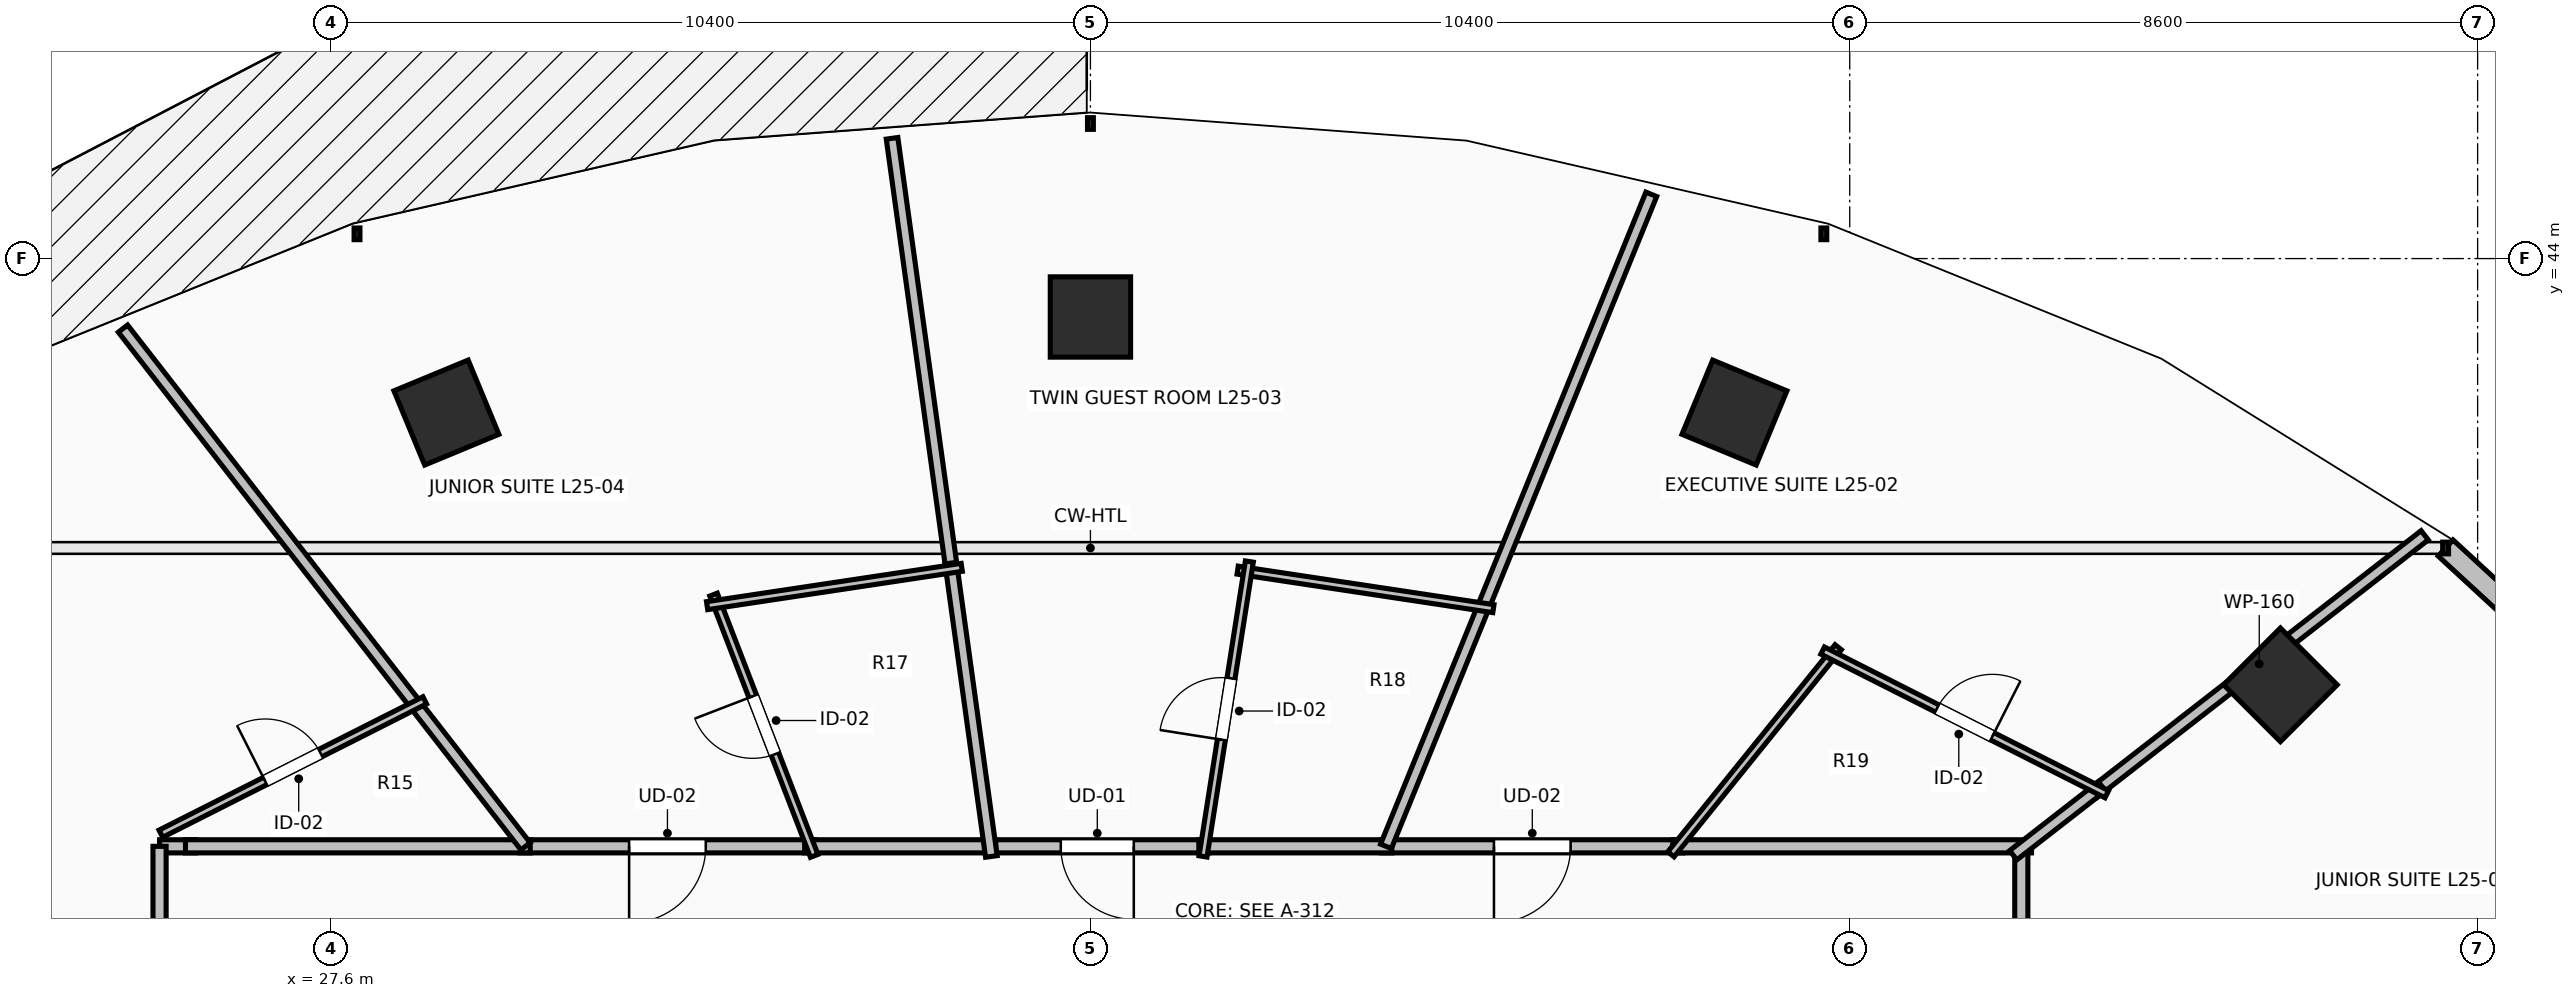
"""IFC4 building model, lengths in metres.
Left out: names, types, materials, properties, quantities, classifications, styles, units other than length and angle.
Written with IfcOpenShell. Run it as: python <this file> out.ifc"""

import sys

from ifc_helpers import new_model, si_unit, direction, frame, frame_2d, origin, origin_2d, place, context, subcontext, project, spatial, rectangle, extrude, element, fill, save


model = new_model("IFC4")
c1 = context("Model", 3, precision=1e-05, world=origin(), true_north=direction((0.0, 1.0)))
c2 = subcontext(c1, "Body", "Model", "MODEL_VIEW")
j1 = project(units=[si_unit("LENGTHUNIT", "METRE"), si_unit("PLANEANGLEUNIT", "RADIAN")], contexts=[c1])
p1 = place(None, origin())
s1 = spatial("IfcSite", under=j1, at=p1, CompositionType="ELEMENT")
p2 = place(p1, origin())
s2 = spatial("IfcBuilding", under=s1, at=p2, CompositionType="ELEMENT")
p3 = place(p2, frame((0.0, 0.0, 96.3)))
s3 = spatial("IfcBuildingStorey", under=s2, at=p3, CompositionType="ELEMENT", Elevation=96.3)
for number, where, z_axis, x_axis in (
    (1, (54.299, 38.162, 0.0), (0.0, 0.0, 1.0), (0.707, 0.707, 0.0)),
    (2, (46.821, 41.891, 0.0), (0.0, 0.0, 1.0), (0.383, 0.924, 0.0)),
    (3, (38.0, 43.2, 0.0), (0.0, 0.0, 1.0), (0.0, 1.0, 0.0)),
    (4, (29.179, 41.891, 0.0), (0.0, 0.0, 1.0), (-0.383, 0.924, 0.0)),
):
    element("IfcColumn", number, at=place(p3, frame(where, z_axis=z_axis, x_axis=x_axis)), inside=s3, PredefinedType="COLUMN", context=c2, shape_type="SweptSolid", body=[
        extrude(rectangle(XDim=1.1, YDim=1.1, at=origin_2d()), origin(), (0.0, 0.0, 1.0), 3.5),
    ])
p4 = place(p3, frame((59.826, 37.028, 0.0), z_axis=(0.0, 0.0, 1.0), x_axis=(-0.735416718093, 0.677615119924, 0.0)))
e5 = element("IfcWall", 5, at=p4, inside=s3, PredefinedType="STANDARD", context=c2, shape_type="SweptSolid", body=[
    extrude(rectangle(XDim=4.439, YDim=0.3, at=frame_2d((2.22, 0.0))), origin(), (0.0, 0.0, 1.0), 3.24),
])
p5 = place(p4, frame((1.32, 0.0, 0.85)))
e6 = element("IfcOpeningElement", 6, at=p5, cuts=e5, PredefinedType="OPENING", context=c2, shape_type="SweptSolid", body=[
    extrude(rectangle(XDim=1.8, YDim=2.19, at=frame_2d((0.9, 1.095))), frame((0.0, 0.165, 0.0), z_axis=(0.0, -1.0, 0.0), x_axis=(1.0, 0.0, 0.0)), (0.0, 0.0, 1.0), 0.33),
])
p6 = place(p3, frame((50.75, 30.853, 0.0), z_axis=(0.0, 0.0, 1.0), x_axis=(0.0, 1.0, 0.0)))
e7 = element("IfcWall", 7, at=p6, inside=s3, PredefinedType="PARTITIONING", context=c2, shape_type="SweptSolid", body=[
    extrude(rectangle(XDim=5.097, YDim=0.18, at=frame_2d((2.548, 0.0))), origin(), (0.0, 0.0, 1.0), 2.432),
])
p7 = place(p6, frame((2.023, 0.0, 0.0)))
e8 = element("IfcOpeningElement", 8, at=p7, cuts=e7, PredefinedType="OPENING", context=c2, shape_type="SweptSolid", body=[
    extrude(rectangle(XDim=1.05, YDim=2.2, at=frame_2d((0.525, 1.1))), frame((0.0, 0.105, 0.0), z_axis=(0.0, -1.0, 0.0), x_axis=(1.0, 0.0, 0.0)), (0.0, 0.0, 1.0), 0.21),
])
p8 = place(p3, frame((46.116, 35.95, 0.0), z_axis=(0.0, 0.0, 1.0), x_axis=(-1.0, 0.0, 0.0)))
e9 = element("IfcWall", 9, at=p8, inside=s3, PredefinedType="PARTITIONING", context=c2, shape_type="SweptSolid", body=[
    extrude(rectangle(XDim=4.128, YDim=0.18, at=frame_2d((2.064, 0.0))), origin(), (0.0, 0.0, 1.0), 2.972),
])
p9 = place(p8, frame((1.539, 0.0, 0.0)))
e10 = element("IfcOpeningElement", 10, at=p9, cuts=e9, PredefinedType="OPENING", context=c2, shape_type="SweptSolid", body=[
    extrude(rectangle(XDim=1.05, YDim=2.2, at=frame_2d((0.525, 1.1))), frame((0.0, 0.105, 0.0), z_axis=(0.0, -1.0, 0.0), x_axis=(1.0, 0.0, 0.0)), (0.0, 0.0, 1.0), 0.21),
])
p10 = place(p3, frame((50.89, 35.95, 0.0), z_axis=(0.0, 0.0, 1.0), x_axis=(-1.0, 0.0, 0.0)))
e11 = element("IfcWall", 11, at=p10, inside=s3, PredefinedType="PARTITIONING", context=c2, shape_type="SweptSolid", body=[
    extrude(rectangle(XDim=4.914, YDim=0.18, at=frame_2d((2.457, 0.0))), origin(), (0.0, 0.0, 1.0), 2.432),
])
p11 = place(p3, frame((39.625, 35.95, 0.0), z_axis=(0.0, 0.0, 1.0), x_axis=(-1.0, 0.0, 0.0)))
e12 = element("IfcWall", 12, at=p11, inside=s3, PredefinedType="PARTITIONING", context=c2, shape_type="SweptSolid", body=[
    extrude(rectangle(XDim=3.062, YDim=0.18, at=frame_2d((1.531, 0.0))), origin(), (0.0, 0.0, 1.0), 2.972),
])
p12 = place(p11, frame((1.031, 0.0, 0.0)))
e13 = element("IfcOpeningElement", 13, at=p12, cuts=e12, PredefinedType="OPENING", context=c2, shape_type="SweptSolid", body=[
    extrude(rectangle(XDim=1.0, YDim=2.15, at=frame_2d((0.5, 1.075))), frame((0.0, 0.105, 0.0), z_axis=(0.0, -1.0, 0.0), x_axis=(1.0, 0.0, 0.0)), (0.0, 0.0, 1.0), 0.21),
])
p13 = place(p3, frame((42.128, 35.95, 0.0), z_axis=(0.0, 0.0, 1.0), x_axis=(-1.0, 0.0, 0.0)))
e14 = element("IfcWall", 14, at=p13, inside=s3, PredefinedType="PARTITIONING", context=c2, shape_type="SweptSolid", body=[
    extrude(rectangle(XDim=2.643, YDim=0.18, at=frame_2d((1.321, 0.0))), origin(), (0.0, 0.0, 1.0), 2.972),
])
p14 = place(p3, frame((34.226, 35.95, 0.0), z_axis=(0.0, 0.0, 1.0), x_axis=(-1.0, 0.0, 0.0)))
e15 = element("IfcWall", 15, at=p14, inside=s3, PredefinedType="PARTITIONING", context=c2, shape_type="SweptSolid", body=[
    extrude(rectangle(XDim=4.039, YDim=0.18, at=frame_2d((2.02, 0.0))), origin(), (0.0, 0.0, 1.0), 2.432),
])
p15 = place(p14, frame((1.494, 0.0, 0.0)))
e16 = element("IfcOpeningElement", 16, at=p15, cuts=e15, PredefinedType="OPENING", context=c2, shape_type="SweptSolid", body=[
    extrude(rectangle(XDim=1.05, YDim=2.2, at=frame_2d((0.525, 1.1))), frame((0.0, 0.105, 0.0), z_axis=(0.0, -1.0, 0.0), x_axis=(1.0, 0.0, 0.0)), (0.0, 0.0, 1.0), 0.21),
])
p16 = place(p3, frame((36.703, 35.95, 0.0), z_axis=(0.0, 0.0, 1.0), x_axis=(-1.0, 0.0, 0.0)))
e17 = element("IfcWall", 17, at=p16, inside=s3, PredefinedType="PARTITIONING", context=c2, shape_type="SweptSolid", body=[
    extrude(rectangle(XDim=2.617, YDim=0.18, at=frame_2d((1.309, 0.0))), origin(), (0.0, 0.0, 1.0), 2.972),
])
p17 = place(p3, frame((25.745, 35.95, 0.0), z_axis=(0.0, 0.0, 1.0), x_axis=(-1.0, 0.0, 0.0)))
e18 = element("IfcWall", 18, at=p17, inside=s3, PredefinedType="PARTITIONING", context=c2, shape_type="SweptSolid", body=[
    extrude(rectangle(XDim=0.495, YDim=0.18, at=frame_2d((0.248, 0.0))), origin(), (0.0, 0.0, 1.0), 3.24),
])
p18 = place(p3, frame((25.25, 35.95, 0.0), z_axis=(0.0, 0.0, 1.0), x_axis=(0.0, -1.0, 0.0)))
e19 = element("IfcWall", 19, at=p18, inside=s3, PredefinedType="PARTITIONING", context=c2, shape_type="SweptSolid", body=[
    extrude(rectangle(XDim=4.822, YDim=0.18, at=frame_2d((2.411, 0.0))), origin(), (0.0, 0.0, 1.0), 2.432),
])
p19 = place(p18, frame((1.886, 0.0, 0.0)))
e20 = element("IfcOpeningElement", 20, at=p19, cuts=e19, PredefinedType="OPENING", context=c2, shape_type="SweptSolid", body=[
    extrude(rectangle(XDim=1.05, YDim=2.2, at=frame_2d((0.525, 1.1))), frame((0.0, 0.105, 0.0), z_axis=(0.0, -1.0, 0.0), x_axis=(1.0, 0.0, 0.0)), (0.0, 0.0, 1.0), 0.21),
])
p20 = place(p3, frame((30.327, 35.95, 0.0), z_axis=(0.0, 0.0, 1.0), x_axis=(-1.0, 0.0, 0.0)))
e21 = element("IfcWall", 21, at=p20, inside=s3, PredefinedType="PARTITIONING", context=c2, shape_type="SweptSolid", body=[
    extrude(rectangle(XDim=4.722, YDim=0.18, at=frame_2d((2.361, 0.0))), origin(), (0.0, 0.0, 1.0), 2.432),
])
p21 = place(p3, frame((56.275, 40.21, 0.0), z_axis=(0.0, 0.0, 1.0), x_axis=(-0.78943235806, -0.613837561614, 0.0)))
e22 = element("IfcWall", 22, at=p21, inside=s3, PredefinedType="PARTITIONING", context=c2, shape_type="SweptSolid", body=[
    extrude(rectangle(XDim=5.741, YDim=0.16, at=frame_2d((2.87, 0.0))), origin(), (0.0, 0.0, 1.0), 2.677),
])
p22 = place(p3, frame((51.854, 36.772, 0.0), z_axis=(0.0, 0.0, 1.0), x_axis=(-0.789420593357, -0.613852691436, 0.0)))
e23 = element("IfcWall", 23, at=p22, inside=s3, PredefinedType="PARTITIONING", context=c2, shape_type="SweptSolid", body=[
    extrude(rectangle(XDim=1.538, YDim=0.16, at=frame_2d((0.769, 0.0))), origin(), (0.0, 0.0, 1.0), 2.922),
])
p23 = place(p3, frame((45.951, 35.841, 0.0), z_axis=(0.0, 0.0, 1.0), x_axis=(0.628411924203, 0.77788074505, 0.0)))
e24 = element("IfcWall", 24, at=p23, inside=s3, PredefinedType="PARTITIONING", context=c2, shape_type="SweptSolid", body=[
    extrude(rectangle(XDim=3.646, YDim=0.11, at=frame_2d((1.823, 0.0))), origin(), (0.0, 0.0, 1.0), 2.432),
])
p24 = place(p3, frame((48.029, 38.631, 0.0), z_axis=(0.0, 0.0, 1.0), x_axis=(0.892459125519, -0.451128262558, 0.0)))
e25 = element("IfcWall", 25, at=p24, inside=s3, PredefinedType="PARTITIONING", context=c2, shape_type="SweptSolid", body=[
    extrude(rectangle(XDim=4.361, YDim=0.11, at=frame_2d((2.18, 0.0))), origin(), (0.0, 0.0, 1.0), 3.24),
])
p25 = place(p24, frame((1.755, 0.0, 0.0)))
e26 = element("IfcOpeningElement", 26, at=p25, cuts=e25, PredefinedType="OPENING", context=c2, shape_type="SweptSolid", body=[
    extrude(rectangle(XDim=0.85, YDim=2.1, at=frame_2d((0.425, 1.05))), frame((0.0, 0.07, 0.0), z_axis=(0.0, -1.0, 0.0), x_axis=(1.0, 0.0, 0.0)), (0.0, 0.0, 1.0), 0.14),
])
p26 = place(p3, frame((45.682, 44.88, 0.0), z_axis=(0.0, 0.0, 1.0), x_axis=(-0.376911553655, -0.9262492541, 0.0)))
e27 = element("IfcWall", 27, at=p26, inside=s3, PredefinedType="PARTITIONING", context=c2, shape_type="SweptSolid", body=[
    extrude(rectangle(XDim=9.641, YDim=0.16, at=frame_2d((4.82, 0.0))), origin(), (0.0, 0.0, 1.0), 2.677),
])
p27 = place(p3, frame((40.017, 39.733, 0.0), z_axis=(0.0, 0.0, 1.0), x_axis=(0.988835521732, -0.149011110196, 0.0)))
e28 = element("IfcWall", 28, at=p27, inside=s3, PredefinedType="PARTITIONING", context=c2, shape_type="SweptSolid", body=[
    extrude(rectangle(XDim=3.542, YDim=0.11, at=frame_2d((1.771, 0.0))), origin(), (0.0, 0.0, 1.0), 3.24),
])
p28 = place(p3, frame((39.542, 35.812, 0.0), z_axis=(0.0, 0.0, 1.0), x_axis=(0.155211191462, 0.98788131172, 0.0)))
e29 = element("IfcWall", 29, at=p28, inside=s3, PredefinedType="PARTITIONING", context=c2, shape_type="SweptSolid", body=[
    extrude(rectangle(XDim=4.088, YDim=0.11, at=frame_2d((2.044, 0.0))), origin(), (0.0, 0.0, 1.0), 2.922),
])
p29 = place(p28, frame((1.619, 0.0, 0.0)))
e30 = element("IfcOpeningElement", 30, at=p29, cuts=e29, PredefinedType="OPENING", context=c2, shape_type="SweptSolid", body=[
    extrude(rectangle(XDim=0.85, YDim=2.1, at=frame_2d((0.425, 1.05))), frame((0.0, 0.07, 0.0), z_axis=(0.0, -1.0, 0.0), x_axis=(1.0, 0.0, 0.0)), (0.0, 0.0, 1.0), 0.14),
])
p30 = place(p3, frame((35.283, 45.647, 0.0), z_axis=(0.0, 0.0, 1.0), x_axis=(0.137015172239, -0.990568948926, 0.0)))
e31 = element("IfcWall", 31, at=p30, inside=s3, PredefinedType="PARTITIONING", context=c2, shape_type="SweptSolid", body=[
    extrude(rectangle(XDim=6.014, YDim=0.16, at=frame_2d((3.007, 0.0))), origin(), (0.0, 0.0, 1.0), 2.432),
])
p31 = place(p3, frame((36.087, 39.829, 0.0), z_axis=(0.0, 0.0, 1.0), x_axis=(0.137071274589, -0.990561187248, 0.0)))
e32 = element("IfcWall", 32, at=p31, inside=s3, PredefinedType="PARTITIONING", context=c2, shape_type="SweptSolid", body=[
    extrude(rectangle(XDim=4.056, YDim=0.16, at=frame_2d((2.028, 0.0))), origin(), (0.0, 0.0, 1.0), 2.922),
])
p32 = place(p3, frame((34.216, 35.819, 0.0), z_axis=(0.0, 0.0, 1.0), x_axis=(-0.359516562862, 0.933138704067, 0.0)))
e33 = element("IfcWall", 33, at=p32, inside=s3, PredefinedType="PARTITIONING", context=c2, shape_type="SweptSolid", body=[
    extrude(rectangle(XDim=3.835, YDim=0.11, at=frame_2d((1.917, 0.0))), origin(), (0.0, 0.0, 1.0), 2.432),
])
p33 = place(p32, frame((1.492, 0.0, 0.0)))
e34 = element("IfcOpeningElement", 34, at=p33, cuts=e33, PredefinedType="OPENING", context=c2, shape_type="SweptSolid", body=[
    extrude(rectangle(XDim=0.85, YDim=2.1, at=frame_2d((0.425, 1.05))), frame((0.0, 0.07, 0.0), z_axis=(0.0, -1.0, 0.0), x_axis=(1.0, 0.0, 0.0)), (0.0, 0.0, 1.0), 0.14),
])
p34 = place(p3, frame((32.75, 39.246, 0.0), z_axis=(0.0, 0.0, 1.0), x_axis=(0.988874324222, 0.148753389525, 0.0)))
e35 = element("IfcWall", 35, at=p34, inside=s3, PredefinedType="PARTITIONING", context=c2, shape_type="SweptSolid", body=[
    extrude(rectangle(XDim=3.527, YDim=0.11, at=frame_2d((1.764, 0.0))), origin(), (0.0, 0.0, 1.0), 2.432),
])
p35 = place(p3, frame((24.749, 43.041, 0.0), z_axis=(0.0, 0.0, 1.0), x_axis=(0.61384652665, -0.789425387051, 0.0)))
e36 = element("IfcWall", 36, at=p35, inside=s3, PredefinedType="PARTITIONING", context=c2, shape_type="SweptSolid", body=[
    extrude(rectangle(XDim=8.983, YDim=0.16, at=frame_2d((4.491, 0.0))), origin(), (0.0, 0.0, 1.0), 2.432),
])
p36 = place(p3, frame((25.268, 36.123, 0.0), z_axis=(0.0, 0.0, 1.0), x_axis=(0.892501687321, 0.451044053425, 0.0)))
e37 = element("IfcWall", 37, at=p36, inside=s3, PredefinedType="PARTITIONING", context=c2, shape_type="SweptSolid", body=[
    extrude(rectangle(XDim=4.049, YDim=0.11, at=frame_2d((2.025, 0.0))), origin(), (0.0, 0.0, 1.0), 2.432),
])
p37 = place(p36, frame((1.6, 0.0, 0.0)))
e38 = element("IfcOpeningElement", 38, at=p37, cuts=e37, PredefinedType="OPENING", context=c2, shape_type="SweptSolid", body=[
    extrude(rectangle(XDim=0.85, YDim=2.1, at=frame_2d((0.425, 1.05))), frame((0.0, 0.07, 0.0), z_axis=(0.0, -1.0, 0.0), x_axis=(1.0, 0.0, 0.0)), (0.0, 0.0, 1.0), 0.14),
])
p38 = place(p3, frame((14.997, 35.359, 0.0), z_axis=(0.0, 0.0, 1.0), x_axis=(0.926288615834, -0.376814808861, 0.0)))
e39 = element("IfcWall", 39, at=p38, inside=s3, PredefinedType="PARTITIONING", context=c2, shape_type="SweptSolid", body=[
    extrude(rectangle(XDim=11.069, YDim=0.16, at=frame_2d((5.534, 0.0))), origin(), (0.0, 0.0, 1.0), 2.677),
])
p39 = place(p9, origin())
e40 = element("IfcDoor", 40, at=p39, inside=s3, OperationType="SINGLE_SWING_RIGHT", PredefinedType="DOOR", context=c2, shape_type="SweptSolid", body=[
    extrude(rectangle(XDim=1.05, YDim=2.2, at=frame_2d((0.525, 1.1))), frame((0.0, 0.025, 0.0), z_axis=(0.0, -1.0, 0.0), x_axis=(1.0, 0.0, 0.0)), (0.0, 0.0, 1.0), 0.05),
])
fill(e10, e40)
p40 = place(p12, origin())
e41 = element("IfcDoor", 41, at=p40, inside=s3, OperationType="SINGLE_SWING_LEFT", PredefinedType="DOOR", context=c2, shape_type="SweptSolid", body=[
    extrude(rectangle(XDim=1.0, YDim=2.15, at=frame_2d((0.5, 1.075))), frame((0.0, 0.025, 0.0), z_axis=(0.0, -1.0, 0.0), x_axis=(1.0, 0.0, 0.0)), (0.0, 0.0, 1.0), 0.05),
])
fill(e13, e41)
p41 = place(p15, origin())
e42 = element("IfcDoor", 42, at=p41, inside=s3, OperationType="SINGLE_SWING_RIGHT", PredefinedType="DOOR", context=c2, shape_type="SweptSolid", body=[
    extrude(rectangle(XDim=1.05, YDim=2.2, at=frame_2d((0.525, 1.1))), frame((0.0, 0.025, 0.0), z_axis=(0.0, -1.0, 0.0), x_axis=(1.0, 0.0, 0.0)), (0.0, 0.0, 1.0), 0.05),
])
fill(e16, e42)
p42 = place(p25, origin())
e43 = element("IfcDoor", 43, at=p42, inside=s3, OperationType="SINGLE_SWING_RIGHT", PredefinedType="DOOR", context=c2, shape_type="SweptSolid", body=[
    extrude(rectangle(XDim=0.85, YDim=2.1, at=frame_2d((0.425, 1.05))), frame((0.0, 0.025, 0.0), z_axis=(0.0, -1.0, 0.0), x_axis=(1.0, 0.0, 0.0)), (0.0, 0.0, 1.0), 0.05),
])
fill(e26, e43)
p43 = place(p29, origin())
e44 = element("IfcDoor", 44, at=p43, inside=s3, OperationType="SINGLE_SWING_LEFT", PredefinedType="DOOR", context=c2, shape_type="SweptSolid", body=[
    extrude(rectangle(XDim=0.85, YDim=2.1, at=frame_2d((0.425, 1.05))), frame((0.0, 0.025, 0.0), z_axis=(0.0, -1.0, 0.0), x_axis=(1.0, 0.0, 0.0)), (0.0, 0.0, 1.0), 0.05),
])
fill(e30, e44)
p44 = place(p33, origin())
e45 = element("IfcDoor", 45, at=p44, inside=s3, OperationType="SINGLE_SWING_RIGHT", PredefinedType="DOOR", context=c2, shape_type="SweptSolid", body=[
    extrude(rectangle(XDim=0.85, YDim=2.1, at=frame_2d((0.425, 1.05))), frame((0.0, 0.025, 0.0), z_axis=(0.0, -1.0, 0.0), x_axis=(1.0, 0.0, 0.0)), (0.0, 0.0, 1.0), 0.05),
])
fill(e34, e45)
p45 = place(p37, origin())
e46 = element("IfcDoor", 46, at=p45, inside=s3, OperationType="SINGLE_SWING_LEFT", PredefinedType="DOOR", context=c2, shape_type="SweptSolid", body=[
    extrude(rectangle(XDim=0.85, YDim=2.1, at=frame_2d((0.425, 1.05))), frame((0.0, 0.025, 0.0), z_axis=(0.0, -1.0, 0.0), x_axis=(1.0, 0.0, 0.0)), (0.0, 0.0, 1.0), 0.05),
])
fill(e38, e46)
save(model, sys.argv[1])
